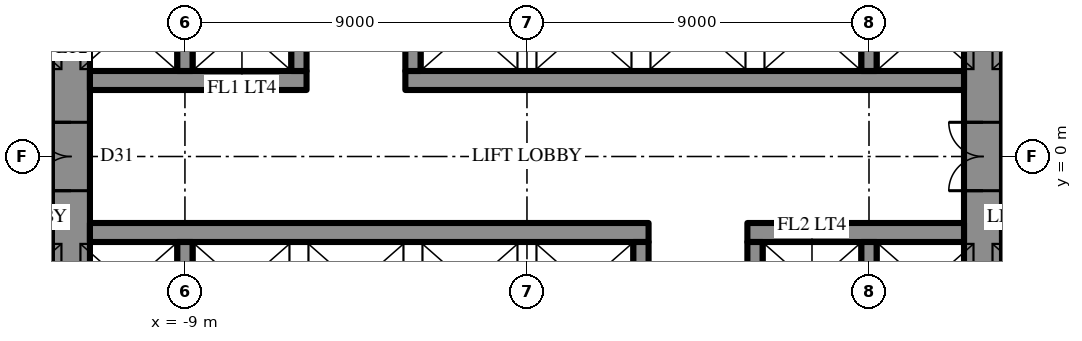
"""IFC4 building model, lengths in metres.
Left out: names, types, materials, properties, quantities, classifications, styles, units other than length and angle.
Written with IfcOpenShell. Run it as: python <this file> out.ifc"""

import sys

from ifc_helpers import new_model, si_unit, direction, frame, frame_2d, origin, place, context, subcontext, project, spatial, rectangle, extrude, element, fill, save


model = new_model("IFC4")
c1 = context("Model", 3, precision=1e-05, world=origin(), true_north=direction((0.0, 1.0)))
c2 = subcontext(c1, "Body", "Model", "MODEL_VIEW")
j1 = project(units=[si_unit("LENGTHUNIT", "METRE"), si_unit("PLANEANGLEUNIT", "RADIAN")], contexts=[c1])
p1 = place(None, origin())
s1 = spatial("IfcSite", under=j1, at=p1, CompositionType="ELEMENT")
p2 = place(p1, origin())
s2 = spatial("IfcBuilding", under=s1, at=p2, CompositionType="ELEMENT")
p3 = place(p2, frame((0.0, 0.0, 203.5)))
s3 = spatial("IfcBuildingStorey", under=s2, at=p3, CompositionType="ELEMENT", Elevation=203.5)
p4 = place(p3, frame((12.0, -10.7, 0.0), z_axis=(0.0, 0.0, 1.0), x_axis=(0.0, 1.0, 0.0)))
e1 = element("IfcWall", 1, at=p4, inside=s3, PredefinedType="SHEAR", context=c2, shape_type="SweptSolid", body=[
    extrude(rectangle(XDim=21.4, YDim=1.0, at=frame_2d((10.7, 0.0))), origin(), (0.0, 0.0, 1.0), 7.0),
])
p5 = place(p4, frame((9.8, 0.0, 0.0)))
e2 = element("IfcOpeningElement", 2, at=p5, cuts=e1, PredefinedType="OPENING", context=c2, shape_type="SweptSolid", body=[
    extrude(rectangle(XDim=1.8, YDim=2.4, at=frame_2d((0.9, 1.2))), frame((0.0, 0.51, 0.0), z_axis=(0.0, -1.0, 0.0), x_axis=(1.0, 0.0, 0.0)), (0.0, 0.0, 1.0), 1.02),
])
p6 = place(p3, frame((-12.0, -10.7, 0.0), z_axis=(0.0, 0.0, 1.0), x_axis=(0.0, 1.0, 0.0)))
e3 = element("IfcWall", 3, at=p6, inside=s3, PredefinedType="SHEAR", context=c2, shape_type="SweptSolid", body=[
    extrude(rectangle(XDim=21.4, YDim=1.0, at=frame_2d((10.7, 0.0))), origin(), (0.0, 0.0, 1.0), 7.0),
])
p7 = place(p6, frame((9.8, 0.0, 0.0)))
e4 = element("IfcOpeningElement", 4, at=p7, cuts=e3, PredefinedType="OPENING", context=c2, shape_type="SweptSolid", body=[
    extrude(rectangle(XDim=1.8, YDim=2.4, at=frame_2d((0.9, 1.2))), frame((0.0, 0.51, 0.0), z_axis=(0.0, -1.0, 0.0), x_axis=(1.0, 0.0, 0.0)), (0.0, 0.0, 1.0), 1.02),
])
p8 = place(p3, frame((-11.5, 2.0, 0.0), z_axis=(0.0, 0.0, 1.0), x_axis=(1.0, 0.0, 0.0)))
e5 = element("IfcWall", 5, at=p8, inside=s3, PredefinedType="SHEAR", context=c2, shape_type="SweptSolid", body=[
    extrude(rectangle(XDim=5.7, YDim=0.5, at=frame_2d((2.85, 0.0))), origin(), (0.0, 0.0, 1.0), 7.0),
])
p9 = place(p3, frame((-3.2, 2.0, 0.0), z_axis=(0.0, 0.0, 1.0), x_axis=(1.0, 0.0, 0.0)))
e6 = element("IfcWall", 6, at=p9, inside=s3, PredefinedType="SHEAR", context=c2, shape_type="SweptSolid", body=[
    extrude(rectangle(XDim=14.7, YDim=0.5, at=frame_2d((7.35, 0.0))), origin(), (0.0, 0.0, 1.0), 7.0),
])
for number, where, z_axis, x_axis in (
    (7, (-9.0, 2.25, 0.0), (0.0, 0.0, 1.0), (0.0, 1.0, 0.0)),
    (8, (-6.0, 2.25, 0.0), (0.0, 0.0, 1.0), (0.0, 1.0, 0.0)),
    (9, (-3.0, 2.25, 0.0), (0.0, 0.0, 1.0), (0.0, 1.0, 0.0)),
    (10, (9.0, 2.25, 0.0), (0.0, 0.0, 1.0), (0.0, 1.0, 0.0)),
):
    element("IfcWall", number, at=place(p3, frame(where, z_axis=z_axis, x_axis=x_axis)), inside=s3, PredefinedType="SHEAR", context=c2, shape_type="SweptSolid", body=[
        extrude(rectangle(XDim=2.3, YDim=0.4, at=frame_2d((1.15, 0.0))), origin(), (0.0, 0.0, 1.0), 7.0),
    ])
p10 = place(p3, frame((11.5, -2.0, 0.0), z_axis=(0.0, 0.0, 1.0), x_axis=(-1.0, 0.0, 0.0)))
e11 = element("IfcWall", 11, at=p10, inside=s3, PredefinedType="SHEAR", context=c2, shape_type="SweptSolid", body=[
    extrude(rectangle(XDim=5.7, YDim=0.5, at=frame_2d((2.85, 0.0))), origin(), (0.0, 0.0, 1.0), 7.0),
])
p11 = place(p3, frame((3.2, -2.0, 0.0), z_axis=(0.0, 0.0, 1.0), x_axis=(-1.0, 0.0, 0.0)))
e12 = element("IfcWall", 12, at=p11, inside=s3, PredefinedType="SHEAR", context=c2, shape_type="SweptSolid", body=[
    extrude(rectangle(XDim=14.7, YDim=0.5, at=frame_2d((7.35, 0.0))), origin(), (0.0, 0.0, 1.0), 7.0),
])
for number, where, z_axis, x_axis in (
    (13, (9.0, -2.25, 0.0), (0.0, 0.0, 1.0), (0.0, -1.0, 0.0)),
    (14, (6.0, -2.25, 0.0), (0.0, 0.0, 1.0), (0.0, -1.0, 0.0)),
    (15, (3.0, -2.25, 0.0), (0.0, 0.0, 1.0), (0.0, -1.0, 0.0)),
    (16, (-9.0, -2.25, 0.0), (0.0, 0.0, 1.0), (0.0, -1.0, 0.0)),
):
    element("IfcWall", number, at=place(p3, frame(where, z_axis=z_axis, x_axis=x_axis)), inside=s3, PredefinedType="SHEAR", context=c2, shape_type="SweptSolid", body=[
        extrude(rectangle(XDim=2.3, YDim=0.4, at=frame_2d((1.15, 0.0))), origin(), (0.0, 0.0, 1.0), 7.0),
    ])
p12 = place(p5, origin())
e17 = element("IfcDoor", 17, at=p12, inside=s3, OperationType="DOUBLE_DOOR_SINGLE_SWING", PredefinedType="DOOR", context=c2, shape_type="SweptSolid", body=[
    extrude(rectangle(XDim=1.8, YDim=2.4, at=frame_2d((0.9, 1.2))), frame((0.0, 0.025, 0.0), z_axis=(0.0, -1.0, 0.0), x_axis=(1.0, 0.0, 0.0)), (0.0, 0.0, 1.0), 0.05),
])
fill(e2, e17)
p13 = place(p7, origin())
e18 = element("IfcDoor", 18, at=p13, inside=s3, OperationType="DOUBLE_DOOR_SINGLE_SWING", PredefinedType="DOOR", context=c2, shape_type="SweptSolid", body=[
    extrude(rectangle(XDim=1.8, YDim=2.4, at=frame_2d((0.9, 1.2))), frame((0.0, 0.025, 0.0), z_axis=(0.0, -1.0, 0.0), x_axis=(1.0, 0.0, 0.0)), (0.0, 0.0, 1.0), 0.05),
])
fill(e4, e18)
save(model, sys.argv[1])
